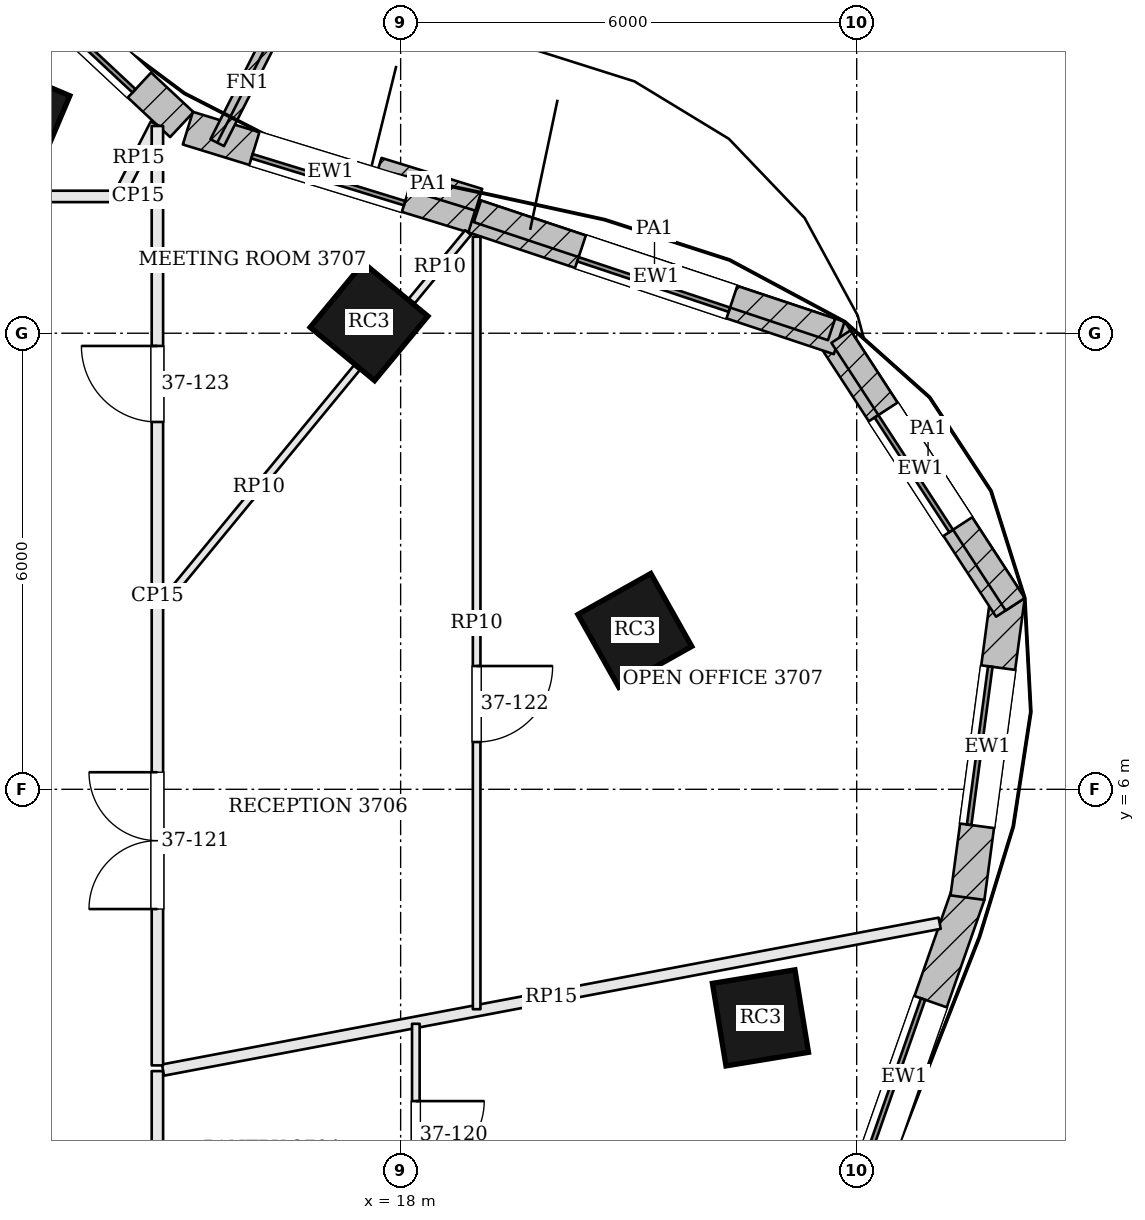
"""IFC4 building model, lengths in metres.
Left out: names, types, materials, properties, quantities, classifications, styles, units other than length and angle.
Written with IfcOpenShell. Run it as: python <this file> out.ifc"""

import sys

from ifc_helpers import new_model, si_unit, direction, frame, frame_2d, origin, origin_2d, place, context, subcontext, project, spatial, rectangle, extrude, element, fill, save


model = new_model("IFC4")
c1 = context("Model", 3, precision=1e-05, world=origin(), true_north=direction((0.0, 1.0)))
c2 = subcontext(c1, "Body", "Model", "MODEL_VIEW")
j1 = project(units=[si_unit("LENGTHUNIT", "METRE"), si_unit("PLANEANGLEUNIT", "RADIAN")], contexts=[c1])
p1 = place(None, origin())
s1 = spatial("IfcSite", under=j1, at=p1, CompositionType="ELEMENT")
p2 = place(p1, origin())
s2 = spatial("IfcBuilding", under=s1, at=p2, CompositionType="ELEMENT")
p3 = place(p2, frame((0.0, 0.0, 153.9)))
s3 = spatial("IfcBuildingStorey", under=s2, at=p3, CompositionType="ELEMENT", Elevation=153.9)
for number, where, z_axis, x_axis in (
    (1, (22.734, 2.993, 0.0), (0.0, 0.0, 1.0), (-0.162, 0.987, 0.0)),
    (2, (21.081, 8.09, 0.0), (0.0, 0.0, 1.0), (-0.49, 0.872, 0.0)),
    (3, (17.584, 12.151, 0.0), (0.0, 0.0, 1.0), (-0.771, 0.637, 0.0)),
    (4, (12.927, 14.832, 0.0), (0.0, 0.0, 1.0), (-0.921, 0.389, 0.0)),
):
    element("IfcColumn", number, at=place(p3, frame(where, z_axis=z_axis, x_axis=x_axis)), inside=s3, PredefinedType="COLUMN", context=c2, shape_type="SweptSolid", body=[
        extrude(rectangle(XDim=1.1, YDim=1.1, at=origin_2d()), origin(), (0.0, 0.0, 1.0), 3.9),
    ])
p4 = place(p3, frame((23.782, -0.189, 0.0), z_axis=(0.0, 0.0, 1.0), x_axis=(0.330794307703, 0.943702880144, 0.0)))
e5 = element("IfcWall", 5, at=p4, inside=s3, PredefinedType="SOLIDWALL", context=c2, shape_type="SweptSolid", body=[
    extrude(rectangle(XDim=5.095, YDim=0.45, at=frame_2d((2.548, 0.0))), origin(), (0.0, 0.0, 1.0), 3.7),
])
p5 = place(p4, frame((1.498, 0.0, 0.9)))
e6 = element("IfcOpeningElement", 6, at=p5, cuts=e5, PredefinedType="OPENING", context=c2, shape_type="SweptSolid", body=[
    extrude(rectangle(XDim=2.1, YDim=2.3, at=frame_2d((1.05, 1.15))), frame((0.0, 0.235, 0.0), z_axis=(0.0, -1.0, 0.0), x_axis=(1.0, 0.0, 0.0)), (0.0, 0.0, 1.0), 0.47),
])
p6 = place(p3, frame((25.457, 4.575, 0.0), z_axis=(0.0, 0.0, 1.0), x_axis=(0.132475046402, 0.991186340746, 0.0)))
e7 = element("IfcWall", 7, at=p6, inside=s3, PredefinedType="SOLIDWALL", context=c2, shape_type="SweptSolid", body=[
    extrude(rectangle(XDim=4.007, YDim=0.45, at=frame_2d((2.003, 0.0))), origin(), (0.0, 0.0, 1.0), 3.7),
])
p7 = place(p6, frame((0.953, 0.0, 0.9)))
e8 = element("IfcOpeningElement", 8, at=p7, cuts=e7, PredefinedType="OPENING", context=c2, shape_type="SweptSolid", body=[
    extrude(rectangle(XDim=2.1, YDim=2.3, at=frame_2d((1.05, 1.15))), frame((0.0, 0.235, 0.0), z_axis=(0.0, -1.0, 0.0), x_axis=(1.0, 0.0, 0.0)), (0.0, 0.0, 1.0), 0.47),
])
p8 = place(p3, frame((26.022, 8.393, 0.0), z_axis=(0.0, 0.0, 1.0), x_axis=(-0.545637310328, 0.838021435035, 0.0)))
e9 = element("IfcWall", 9, at=p8, inside=s3, PredefinedType="SOLIDWALL", context=c2, shape_type="SweptSolid", body=[
    extrude(rectangle(XDim=4.336, YDim=0.45, at=frame_2d((2.168, 0.0))), origin(), (0.0, 0.0, 1.0), 3.7),
])
p9 = place(p8, frame((1.268, 0.0, 0.9)))
e10 = element("IfcOpeningElement", 10, at=p9, cuts=e9, PredefinedType="OPENING", context=c2, shape_type="SweptSolid", body=[
    extrude(rectangle(XDim=1.8, YDim=2.3, at=frame_2d((0.9, 1.15))), frame((0.0, 0.235, 0.0), z_axis=(0.0, -1.0, 0.0), x_axis=(1.0, 0.0, 0.0)), (0.0, 0.0, 1.0), 0.47),
])
p10 = place(p3, frame((23.77, 11.938, 0.0), z_axis=(0.0, 0.0, 1.0), x_axis=(-0.948673679101, 0.316256621402, 0.0)))
e11 = element("IfcWall", 11, at=p10, inside=s3, PredefinedType="SOLIDWALL", context=c2, shape_type="SweptSolid", body=[
    extrude(rectangle(XDim=5.076, YDim=0.45, at=frame_2d((2.538, 0.0))), origin(), (0.0, 0.0, 1.0), 3.7),
])
p11 = place(p10, frame((1.488, 0.0, 0.9)))
e12 = element("IfcOpeningElement", 12, at=p11, cuts=e11, PredefinedType="OPENING", context=c2, shape_type="SweptSolid", body=[
    extrude(rectangle(XDim=2.1, YDim=2.3, at=frame_2d((1.05, 1.15))), frame((0.0, 0.235, 0.0), z_axis=(0.0, -1.0, 0.0), x_axis=(1.0, 0.0, 0.0)), (0.0, 0.0, 1.0), 0.47),
])
p12 = place(p3, frame((18.958, 13.542, 0.0), z_axis=(0.0, 0.0, 1.0), x_axis=(-0.955792437529, 0.294042201668, 0.0)))
e13 = element("IfcWall", 13, at=p12, inside=s3, PredefinedType="SOLIDWALL", context=c2, shape_type="SweptSolid", body=[
    extrude(rectangle(XDim=3.931, YDim=0.45, at=frame_2d((1.965, 0.0))), origin(), (0.0, 0.0, 1.0), 3.7),
])
p13 = place(p12, frame((0.915, 0.0, 0.9)))
e14 = element("IfcOpeningElement", 14, at=p13, cuts=e13, PredefinedType="OPENING", context=c2, shape_type="SweptSolid", body=[
    extrude(rectangle(XDim=2.1, YDim=2.3, at=frame_2d((1.05, 1.15))), frame((0.0, 0.235, 0.0), z_axis=(0.0, -1.0, 0.0), x_axis=(1.0, 0.0, 0.0)), (0.0, 0.0, 1.0), 0.47),
])
p14 = place(p3, frame((15.121, 14.745, 0.0), z_axis=(0.0, 0.0, 1.0), x_axis=(-0.730618259172, 0.68278617397, 0.0)))
e15 = element("IfcWall", 15, at=p14, inside=s3, PredefinedType="SOLIDWALL", context=c2, shape_type="SweptSolid", body=[
    extrude(rectangle(XDim=3.624, YDim=0.45, at=frame_2d((1.812, 0.0))), origin(), (0.0, 0.0, 1.0), 3.7),
])
p15 = place(p14, frame((0.762, 0.0, 0.9)))
e16 = element("IfcOpeningElement", 16, at=p15, cuts=e15, PredefinedType="OPENING", context=c2, shape_type="SweptSolid", body=[
    extrude(rectangle(XDim=2.1, YDim=2.3, at=frame_2d((1.05, 1.15))), frame((0.0, 0.235, 0.0), z_axis=(0.0, -1.0, 0.0), x_axis=(1.0, 0.0, 0.0)), (0.0, 0.0, 1.0), 0.47),
])
p16 = place(p3, frame((15.587, 14.507, 0.0), z_axis=(0.0, 0.0, 1.0), x_axis=(0.452117231361, 0.89195852432, 0.0)))
e17 = element("IfcWall", 17, at=p16, inside=s3, PredefinedType="SOLIDWALL", context=c2, shape_type="SweptSolid", body=[
    extrude(rectangle(XDim=1.75, YDim=0.2, at=frame_2d((0.875, 0.0))), origin(), (0.0, 0.0, 1.0), 3.7),
])
p17 = place(p3, frame((26.085, 8.434, 3.9), z_axis=(0.0, 0.0, 1.0), x_axis=(-0.545602949585, 0.838043806375, 0.0)))
e18 = element("IfcWall", 18, at=p17, inside=s3, PredefinedType="PARAPET", context=c2, shape_type="SweptSolid", body=[
    extrude(rectangle(XDim=4.202, YDim=0.3, at=frame_2d((2.101, 0.0))), origin(), (0.0, 0.0, 1.0), 1.1),
])
p18 = place(p3, frame((23.67, 12.05, 3.9), z_axis=(0.0, 0.0, 1.0), x_axis=(-0.948668385515, 0.316272500107, 0.0)))
e19 = element("IfcWall", 19, at=p18, inside=s3, PredefinedType="PARAPET", context=c2, shape_type="SweptSolid", body=[
    extrude(rectangle(XDim=4.912, YDim=0.3, at=frame_2d((2.456, 0.0))), origin(), (0.0, 0.0, 1.0), 1.1),
])
p19 = place(p3, frame((19.029, 13.756, 3.9), z_axis=(0.0, 0.0, 1.0), x_axis=(-0.955790436059, 0.294048707425, 0.0)))
e20 = element("IfcWall", 20, at=p19, inside=s3, PredefinedType="PARAPET", context=c2, shape_type="SweptSolid", body=[
    extrude(rectangle(XDim=1.386, YDim=0.3, at=frame_2d((0.693, 0.0))), origin(), (0.0, 0.0, 1.0), 1.1),
])
p20 = place(p3, frame((14.292, 13.8, 0.0), z_axis=(0.0, 0.0, 1.0), x_axis=(-1.0, 0.0, 0.0)))
e21 = element("IfcWall", 21, at=p20, inside=s3, PredefinedType="PARTITIONING", context=c2, shape_type="SweptSolid", body=[
    extrude(rectangle(XDim=14.078, YDim=0.15, at=frame_2d((7.039, 0.0))), origin(), (0.0, 0.0, 1.0), 3.198),
])
p21 = place(p20, frame((2.45, 0.0, 0.0)))
e22 = element("IfcOpeningElement", 22, at=p21, cuts=e21, PredefinedType="OPENING", context=c2, shape_type="SweptSolid", body=[
    extrude(rectangle(XDim=1.8, YDim=2.1, at=frame_2d((0.9, 1.05))), frame((0.0, 0.085, 0.0), z_axis=(0.0, -1.0, 0.0), x_axis=(1.0, 0.0, 0.0)), (0.0, 0.0, 1.0), 0.17),
])
p22 = place(p20, frame((7.971, 0.0, 0.0)))
e23 = element("IfcOpeningElement", 23, at=p22, cuts=e21, PredefinedType="OPENING", context=c2, shape_type="SweptSolid", body=[
    extrude(rectangle(XDim=1.0, YDim=2.4, at=frame_2d((0.5, 1.2))), frame((0.0, 0.085, 0.0), z_axis=(0.0, -1.0, 0.0), x_axis=(1.0, 0.0, 0.0)), (0.0, 0.0, 1.0), 0.17),
])
p23 = place(p20, frame((12.15, 0.0, 0.0)))
e24 = element("IfcOpeningElement", 24, at=p23, cuts=e21, PredefinedType="OPENING", context=c2, shape_type="SweptSolid", body=[
    extrude(rectangle(XDim=0.9, YDim=2.1, at=frame_2d((0.45, 1.05))), frame((0.0, 0.085, 0.0), z_axis=(0.0, -1.0, 0.0), x_axis=(1.0, 0.0, 0.0)), (0.0, 0.0, 1.0), 0.17),
])
p24 = place(p3, frame((14.779, 14.751, 0.0), z_axis=(0.0, 0.0, 1.0), x_axis=(-0.45584263358, -0.890060387508, 0.0)))
e25 = element("IfcWall", 25, at=p24, inside=s3, PredefinedType="PARTITIONING", context=c2, shape_type="SweptSolid", body=[
    extrude(rectangle(XDim=0.993, YDim=0.15, at=frame_2d((0.497, 0.0))), origin(), (0.0, 0.0, 1.0), 3.198),
])
p25 = place(p3, frame((14.8, -4.725, 0.0), z_axis=(0.0, 0.0, 1.0), x_axis=(0.0, 1.0, 0.0)))
e26 = element("IfcWall", 26, at=p25, inside=s3, PredefinedType="PARTITIONING", context=c2, shape_type="SweptSolid", body=[
    extrude(rectangle(XDim=7.018, YDim=0.15, at=frame_2d((3.509, 0.0))), origin(), (0.0, 0.0, 1.0), 3.198),
])
p26 = place(p25, frame((2.307, 0.0, 0.0)))
e27 = element("IfcOpeningElement", 27, at=p26, cuts=e26, PredefinedType="OPENING", context=c2, shape_type="SweptSolid", body=[
    extrude(rectangle(XDim=1.0, YDim=2.4, at=frame_2d((0.5, 1.2))), frame((0.0, 0.085, 0.0), z_axis=(0.0, -1.0, 0.0), x_axis=(1.0, 0.0, 0.0)), (0.0, 0.0, 1.0), 0.17),
])
p27 = place(p3, frame((25.092, 4.238, 0.0), z_axis=(0.0, 0.0, 1.0), x_axis=(-0.98259573428, -0.185756892135, 0.0)))
e28 = element("IfcWall", 28, at=p27, inside=s3, PredefinedType="PARTITIONING", context=c2, shape_type="SweptSolid", body=[
    extrude(rectangle(XDim=10.399, YDim=0.15, at=frame_2d((5.199, 0.0))), origin(), (0.0, 0.0, 1.0), 3.198),
])
p28 = place(p3, frame((14.8, 2.368, 0.0), z_axis=(0.0, 0.0, 1.0), x_axis=(0.0, 1.0, 0.0)))
e29 = element("IfcWall", 29, at=p28, inside=s3, PredefinedType="PARTITIONING", context=c2, shape_type="SweptSolid", body=[
    extrude(rectangle(XDim=12.359, YDim=0.15, at=frame_2d((6.18, 0.0))), origin(), (0.0, 0.0, 1.0), 3.198),
])
p29 = place(p28, frame((2.057, 0.0, 0.0)))
e30 = element("IfcOpeningElement", 30, at=p29, cuts=e29, PredefinedType="OPENING", context=c2, shape_type="SweptSolid", body=[
    extrude(rectangle(XDim=1.8, YDim=2.1, at=frame_2d((0.9, 1.05))), frame((0.0, 0.085, 0.0), z_axis=(0.0, -1.0, 0.0), x_axis=(1.0, 0.0, 0.0)), (0.0, 0.0, 1.0), 0.17),
])
p30 = place(p28, frame((8.465, 0.0, 0.0)))
e31 = element("IfcOpeningElement", 31, at=p30, cuts=e29, PredefinedType="OPENING", context=c2, shape_type="SweptSolid", body=[
    extrude(rectangle(XDim=1.0, YDim=2.4, at=frame_2d((0.5, 1.2))), frame((0.0, 0.085, 0.0), z_axis=(0.0, -1.0, 0.0), x_axis=(1.0, 0.0, 0.0)), (0.0, 0.0, 1.0), 0.17),
])
p31 = place(p3, frame((14.725, 13.8, 0.0), z_axis=(0.0, 0.0, 1.0), x_axis=(-1.0, 0.0, 0.0)))
e32 = element("IfcWall", 32, at=p31, inside=s3, PredefinedType="PARTITIONING", context=c2, shape_type="SweptSolid", body=[
    extrude(rectangle(XDim=0.358, YDim=0.15, at=frame_2d((0.179, 0.0))), origin(), (0.0, 0.0, 1.0), 3.198),
])
p32 = place(p3, frame((18.2, 2.915, 0.0), z_axis=(0.0, 0.0, 1.0), x_axis=(0.0, -1.0, 0.0)))
e33 = element("IfcWall", 33, at=p32, inside=s3, PredefinedType="PARTITIONING", context=c2, shape_type="SweptSolid", body=[
    extrude(rectangle(XDim=11.115, YDim=0.1, at=frame_2d((5.558, 0.0))), origin(), (0.0, 0.0, 1.0), 3.184),
])
p33 = place(p32, frame((1.017, 0.0, 0.0)))
e34 = element("IfcOpeningElement", 34, at=p33, cuts=e33, PredefinedType="OPENING", context=c2, shape_type="SweptSolid", body=[
    extrude(rectangle(XDim=0.9, YDim=2.1, at=frame_2d((0.45, 1.05))), frame((0.0, 0.06, 0.0), z_axis=(0.0, -1.0, 0.0), x_axis=(1.0, 0.0, 0.0)), (0.0, 0.0, 1.0), 0.12),
])
p34 = place(p3, frame((19.0, 13.27, 0.0), z_axis=(0.0, 0.0, 1.0), x_axis=(0.0, -1.0, 0.0)))
e35 = element("IfcWall", 35, at=p34, inside=s3, PredefinedType="PARTITIONING", context=c2, shape_type="SweptSolid", body=[
    extrude(rectangle(XDim=10.163, YDim=0.1, at=frame_2d((5.082, 0.0))), origin(), (0.0, 0.0, 1.0), 3.184),
])
p35 = place(p34, frame((5.648, 0.0, 0.0)))
e36 = element("IfcOpeningElement", 36, at=p35, cuts=e35, PredefinedType="OPENING", context=c2, shape_type="SweptSolid", body=[
    extrude(rectangle(XDim=1.0, YDim=2.1, at=frame_2d((0.5, 1.05))), frame((0.0, 0.06, 0.0), z_axis=(0.0, -1.0, 0.0), x_axis=(1.0, 0.0, 0.0)), (0.0, 0.0, 1.0), 0.12),
])
p36 = place(p3, frame((14.848, 8.415, 0.0), z_axis=(0.0, 0.0, 1.0), x_axis=(0.63542004032, 0.77216667395, 0.0)))
e37 = element("IfcWall", 37, at=p36, inside=s3, PredefinedType="PARTITIONING", context=c2, shape_type="SweptSolid", body=[
    extrude(rectangle(XDim=4.053, YDim=0.1, at=frame_2d((2.026, 0.0))), origin(), (0.0, 0.0, 1.0), 3.184),
])
p37 = place(p3, frame((18.147, 12.425, 0.0), z_axis=(0.0, 0.0, 1.0), x_axis=(0.635347162235, 0.772226639945, 0.0)))
e38 = element("IfcWall", 38, at=p37, inside=s3, PredefinedType="PARTITIONING", context=c2, shape_type="SweptSolid", body=[
    extrude(rectangle(XDim=1.165, YDim=0.1, at=frame_2d((0.583, 0.0))), origin(), (0.0, 0.0, 1.0), 3.184),
])
p38 = place(p5, origin())
e39 = element("IfcWindow", 39, at=p38, inside=s3, PartitioningType="SINGLE_PANEL", PredefinedType="WINDOW", context=c2, shape_type="SweptSolid", body=[
    extrude(rectangle(XDim=2.1, YDim=2.3, at=frame_2d((1.05, 1.15))), frame((0.0, 0.135, 0.0), z_axis=(0.0, -1.0, 0.0), x_axis=(1.0, 0.0, 0.0)), (0.0, 0.0, 1.0), 0.06),
])
fill(e6, e39)
p39 = place(p7, origin())
e40 = element("IfcWindow", 40, at=p39, inside=s3, PartitioningType="SINGLE_PANEL", PredefinedType="WINDOW", context=c2, shape_type="SweptSolid", body=[
    extrude(rectangle(XDim=2.1, YDim=2.3, at=frame_2d((1.05, 1.15))), frame((0.0, 0.135, 0.0), z_axis=(0.0, -1.0, 0.0), x_axis=(1.0, 0.0, 0.0)), (0.0, 0.0, 1.0), 0.06),
])
fill(e8, e40)
p40 = place(p9, origin())
e41 = element("IfcWindow", 41, at=p40, inside=s3, PartitioningType="SINGLE_PANEL", PredefinedType="WINDOW", context=c2, shape_type="SweptSolid", body=[
    extrude(rectangle(XDim=1.8, YDim=2.3, at=frame_2d((0.9, 1.15))), frame((0.0, 0.135, 0.0), z_axis=(0.0, -1.0, 0.0), x_axis=(1.0, 0.0, 0.0)), (0.0, 0.0, 1.0), 0.06),
])
fill(e10, e41)
p41 = place(p11, origin())
e42 = element("IfcWindow", 42, at=p41, inside=s3, PartitioningType="SINGLE_PANEL", PredefinedType="WINDOW", context=c2, shape_type="SweptSolid", body=[
    extrude(rectangle(XDim=2.1, YDim=2.3, at=frame_2d((1.05, 1.15))), frame((0.0, 0.135, 0.0), z_axis=(0.0, -1.0, 0.0), x_axis=(1.0, 0.0, 0.0)), (0.0, 0.0, 1.0), 0.06),
])
fill(e12, e42)
p42 = place(p13, origin())
e43 = element("IfcWindow", 43, at=p42, inside=s3, PartitioningType="SINGLE_PANEL", PredefinedType="WINDOW", context=c2, shape_type="SweptSolid", body=[
    extrude(rectangle(XDim=2.1, YDim=2.3, at=frame_2d((1.05, 1.15))), frame((0.0, 0.135, 0.0), z_axis=(0.0, -1.0, 0.0), x_axis=(1.0, 0.0, 0.0)), (0.0, 0.0, 1.0), 0.06),
])
fill(e14, e43)
p43 = place(p15, origin())
e44 = element("IfcWindow", 44, at=p43, inside=s3, PartitioningType="SINGLE_PANEL", PredefinedType="WINDOW", context=c2, shape_type="SweptSolid", body=[
    extrude(rectangle(XDim=2.1, YDim=2.3, at=frame_2d((1.05, 1.15))), frame((0.0, 0.135, 0.0), z_axis=(0.0, -1.0, 0.0), x_axis=(1.0, 0.0, 0.0)), (0.0, 0.0, 1.0), 0.06),
])
fill(e16, e44)
p44 = place(p33, origin())
e45 = element("IfcDoor", 45, at=p44, inside=s3, OperationType="SINGLE_SWING_LEFT", PredefinedType="DOOR", context=c2, shape_type="SweptSolid", body=[
    extrude(rectangle(XDim=0.9, YDim=2.1, at=frame_2d((0.45, 1.05))), frame((0.0, 0.025, 0.0), z_axis=(0.0, -1.0, 0.0), x_axis=(1.0, 0.0, 0.0)), (0.0, 0.0, 1.0), 0.05),
])
fill(e34, e45)
p45 = place(p29, origin())
e46 = element("IfcDoor", 46, at=p45, inside=s3, OperationType="DOUBLE_DOOR_SINGLE_SWING", PredefinedType="DOOR", context=c2, shape_type="SweptSolid", body=[
    extrude(rectangle(XDim=1.8, YDim=2.1, at=frame_2d((0.9, 1.05))), frame((0.0, 0.025, 0.0), z_axis=(0.0, -1.0, 0.0), x_axis=(1.0, 0.0, 0.0)), (0.0, 0.0, 1.0), 0.05),
])
fill(e30, e46)
p46 = place(p35, origin())
e47 = element("IfcDoor", 47, at=p46, inside=s3, OperationType="SINGLE_SWING_LEFT", PredefinedType="DOOR", context=c2, shape_type="SweptSolid", body=[
    extrude(rectangle(XDim=1.0, YDim=2.1, at=frame_2d((0.5, 1.05))), frame((0.0, 0.025, 0.0), z_axis=(0.0, -1.0, 0.0), x_axis=(1.0, 0.0, 0.0)), (0.0, 0.0, 1.0), 0.05),
])
fill(e36, e47)
p47 = place(p30, origin())
e48 = element("IfcDoor", 48, at=p47, inside=s3, OperationType="SINGLE_SWING_RIGHT", PredefinedType="DOOR", context=c2, shape_type="SweptSolid", body=[
    extrude(rectangle(XDim=1.0, YDim=2.4, at=frame_2d((0.5, 1.2))), frame((0.0, 0.025, 0.0), z_axis=(0.0, -1.0, 0.0), x_axis=(1.0, 0.0, 0.0)), (0.0, 0.0, 1.0), 0.05),
])
fill(e31, e48)
save(model, sys.argv[1])
